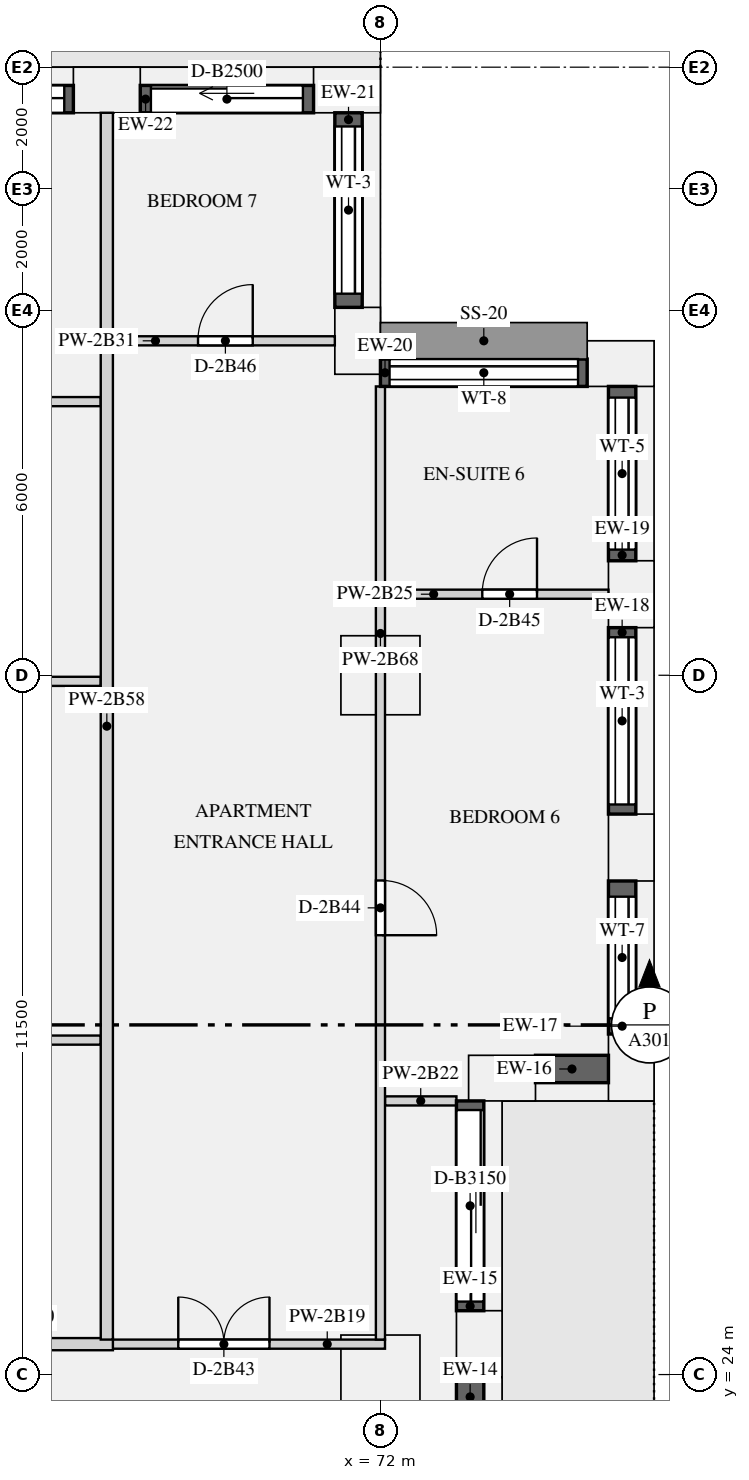
"""IFC4 building model, lengths in metres.
Left out: names, types, materials, properties, quantities, classifications, styles, units other than length and angle.
Written with IfcOpenShell. Run it as: python <this file> out.ifc"""

import sys

from ifc_helpers import new_model, si_unit, direction, frame, frame_2d, origin, origin_2d, place, context, subcontext, project, spatial, rectangle, extrude, element, fill, save


model = new_model("IFC4")
c1 = context("Model", 3, precision=1e-05, world=origin(), true_north=direction((0.0, 1.0)))
c2 = subcontext(c1, "Body", "Model", "MODEL_VIEW")
j1 = project(units=[si_unit("LENGTHUNIT", "METRE"), si_unit("PLANEANGLEUNIT", "RADIAN")], contexts=[c1])
p1 = place(None, origin())
s1 = spatial("IfcSite", under=j1, at=p1, CompositionType="ELEMENT")
p2 = place(p1, origin())
s2 = spatial("IfcBuilding", under=s1, at=p2, CompositionType="ELEMENT")
p3 = place(p2, frame((0.0, 0.0, 93.0)))
s3 = spatial("IfcBuildingStorey", under=s2, at=p3, CompositionType="ELEMENT", Elevation=93.0)
for number, where, z_axis, x_axis in (
    (1, (73.625, 24.5, 0.0), (0.0, 0.0, 1.0), (0.0, 1.0, 0.0)),
    (2, (74.0, 28.875, 0.0), (0.0, 0.0, 1.0), (1.0, 0.0, 0.0)),
    (3, (76.125, 29.05, 0.0), (0.0, 0.0, 1.0), (0.0, 1.0, 0.0)),
    (4, (76.125, 32.667, 0.0), (0.0, 0.0, 1.0), (0.0, 1.0, 0.0)),
    (5, (76.125, 36.833, 0.0), (0.0, 0.0, 1.0), (0.0, 1.0, 0.0)),
    (6, (75.95, 40.625, 0.0), (0.0, 0.0, 1.0), (-1.0, 0.0, 0.0)),
    (7, (71.625, 41.0, 0.0), (0.0, 0.0, 1.0), (0.0, 1.0, 0.0)),
    (8, (71.45, 45.125, 0.0), (0.0, 0.0, 1.0), (-1.0, 0.0, 0.0)),
    (9, (67.5, 45.125, 0.0), (0.0, 0.0, 1.0), (-1.0, 0.0, 0.0)),
):
    element("IfcColumn", number, at=place(p3, frame(where, z_axis=z_axis, x_axis=x_axis)), inside=s3, PredefinedType="USERDEFINED", context=c2, shape_type="SweptSolid", body=[
        extrude(rectangle(XDim=1.1, YDim=0.75, at=origin_2d()), origin(), (0.0, 0.0, 1.0), 3.15),
    ])
for number, where, z_axis, x_axis in (
    (10, (72.0, 24.0, 0.0), (0.0, 0.0, 1.0), (1.0, 0.0, 0.0)),
    (11, (72.0, 35.5, 0.0), (0.0, 0.0, 1.0), (1.0, 0.0, 0.0)),
):
    element("IfcColumn", number, at=place(p3, frame(where, z_axis=z_axis, x_axis=x_axis)), inside=s3, PredefinedType="COLUMN", context=c2, shape_type="SweptSolid", body=[
        extrude(rectangle(XDim=1.3, YDim=1.3, at=origin_2d()), origin(), (0.0, 0.0, 1.0), 3.15),
    ])
p4 = place(p3, frame((73.475, 21.05, 0.0), z_axis=(0.0, 0.0, 1.0), x_axis=(0.0, 1.0, 0.0)))
e12 = element("IfcWall", 12, at=p4, inside=s3, PredefinedType="SOLIDWALL", context=c2, shape_type="SweptSolid", body=[
    extrude(rectangle(XDim=2.9, YDim=0.45, at=frame_2d((1.45, 0.0))), origin(), (0.0, 0.0, 1.0), 2.83),
])
p5 = place(p4, frame((0.165, 0.0, 0.0)))
e13 = element("IfcOpeningElement", 13, at=p5, cuts=e12, PredefinedType="OPENING", context=c2, shape_type="SweptSolid", body=[
    extrude(rectangle(XDim=2.1, YDim=2.3, at=frame_2d((1.05, 1.15))), frame((0.0, 0.235, 0.0), z_axis=(0.0, -1.0, 0.0), x_axis=(1.0, 0.0, 0.0)), (0.0, 0.0, 1.0), 0.47),
])
p6 = place(p3, frame((73.475, 25.05, 0.0), z_axis=(0.0, 0.0, 1.0), x_axis=(0.0, 1.0, 0.0)))
e14 = element("IfcWall", 14, at=p6, inside=s3, PredefinedType="SOLIDWALL", context=c2, shape_type="SweptSolid", body=[
    extrude(rectangle(XDim=3.45, YDim=0.45, at=frame_2d((1.725, 0.0))), origin(), (0.0, 0.0, 1.0), 2.83),
])
p7 = place(p6, frame((0.15, 0.0, 0.0)))
e15 = element("IfcOpeningElement", 15, at=p7, cuts=e14, PredefinedType="OPENING", context=c2, shape_type="SweptSolid", body=[
    extrude(rectangle(XDim=3.15, YDim=2.3, at=frame_2d((1.575, 1.15))), frame((0.0, 0.235, 0.0), z_axis=(0.0, -1.0, 0.0), x_axis=(1.0, 0.0, 0.0)), (0.0, 0.0, 1.0), 0.47),
])
p8 = place(p3, frame((74.55, 29.025, 0.9), z_axis=(0.0, 0.0, 1.0), x_axis=(1.0, 0.0, 0.0)))
e16 = element("IfcWall", 16, at=p8, inside=s3, PredefinedType="SOLIDWALL", context=c2, shape_type="SweptSolid", body=[
    extrude(rectangle(XDim=1.2, YDim=0.45, at=frame_2d((0.6, 0.0))), origin(), (0.0, 0.0, 1.0), 1.93),
])
p9 = place(p3, frame((75.975, 29.6, 0.9), z_axis=(0.0, 0.0, 1.0), x_axis=(0.0, 1.0, 0.0)))
e17 = element("IfcWall", 17, at=p9, inside=s3, PredefinedType="SOLIDWALL", context=c2, shape_type="SweptSolid", body=[
    extrude(rectangle(XDim=2.517, YDim=0.45, at=frame_2d((1.258, 0.0))), origin(), (0.0, 0.0, 1.0), 1.93),
])
p10 = place(p9, frame((0.259, 0.0, 0.15)))
e18 = element("IfcOpeningElement", 18, at=p10, cuts=e17, PredefinedType="OPENING", context=c2, shape_type="SweptSolid", body=[
    extrude(rectangle(XDim=2.0, YDim=1.5, at=frame_2d((1.0, 0.75))), frame((0.0, 0.235, 0.0), z_axis=(0.0, -1.0, 0.0), x_axis=(1.0, 0.0, 0.0)), (0.0, 0.0, 1.0), 0.47),
])
p11 = place(p3, frame((75.975, 33.217, 0.9), z_axis=(0.0, 0.0, 1.0), x_axis=(0.0, 1.0, 0.0)))
e19 = element("IfcWall", 19, at=p11, inside=s3, PredefinedType="SOLIDWALL", context=c2, shape_type="SweptSolid", body=[
    extrude(rectangle(XDim=3.066, YDim=0.45, at=frame_2d((1.533, 0.0))), origin(), (0.0, 0.0, 1.0), 1.93),
])
p12 = place(p11, frame((0.158, 0.0, 0.15)))
e20 = element("IfcOpeningElement", 20, at=p12, cuts=e19, PredefinedType="OPENING", context=c2, shape_type="SweptSolid", body=[
    extrude(rectangle(XDim=2.75, YDim=1.5, at=frame_2d((1.375, 0.75))), frame((0.0, 0.235, 0.0), z_axis=(0.0, -1.0, 0.0), x_axis=(1.0, 0.0, 0.0)), (0.0, 0.0, 1.0), 0.47),
])
p13 = place(p3, frame((75.975, 37.383, 0.9), z_axis=(0.0, 0.0, 1.0), x_axis=(0.0, 1.0, 0.0)))
e21 = element("IfcWall", 21, at=p13, inside=s3, PredefinedType="SOLIDWALL", context=c2, shape_type="SweptSolid", body=[
    extrude(rectangle(XDim=2.867, YDim=0.45, at=frame_2d((1.434, 0.0))), origin(), (0.0, 0.0, 1.0), 1.93),
])
p14 = place(p13, frame((0.184, 0.0, 0.15)))
e22 = element("IfcOpeningElement", 22, at=p14, cuts=e21, PredefinedType="OPENING", context=c2, shape_type="SweptSolid", body=[
    extrude(rectangle(XDim=2.5, YDim=1.5, at=frame_2d((1.25, 0.75))), frame((0.0, 0.235, 0.0), z_axis=(0.0, -1.0, 0.0), x_axis=(1.0, 0.0, 0.0)), (0.0, 0.0, 1.0), 0.47),
])
p15 = place(p3, frame((75.4, 40.475, 0.9), z_axis=(0.0, 0.0, 1.0), x_axis=(-1.0, 0.0, 0.0)))
e23 = element("IfcWall", 23, at=p15, inside=s3, PredefinedType="SOLIDWALL", context=c2, shape_type="SweptSolid", body=[
    extrude(rectangle(XDim=3.4, YDim=0.45, at=frame_2d((1.7, 0.0))), origin(), (0.0, 0.0, 1.0), 1.93),
])
p16 = place(p15, frame((0.15, 0.0, 0.15)))
e24 = element("IfcOpeningElement", 24, at=p16, cuts=e23, PredefinedType="OPENING", context=c2, shape_type="SweptSolid", body=[
    extrude(rectangle(XDim=3.1, YDim=1.5, at=frame_2d((1.55, 0.75))), frame((0.0, 0.235, 0.0), z_axis=(0.0, -1.0, 0.0), x_axis=(1.0, 0.0, 0.0)), (0.0, 0.0, 1.0), 0.47),
])
p17 = place(p3, frame((71.475, 41.55, 0.9), z_axis=(0.0, 0.0, 1.0), x_axis=(0.0, 1.0, 0.0)))
e25 = element("IfcWall", 25, at=p17, inside=s3, PredefinedType="SOLIDWALL", context=c2, shape_type="SweptSolid", body=[
    extrude(rectangle(XDim=3.2, YDim=0.45, at=frame_2d((1.6, 0.0))), origin(), (0.0, 0.0, 1.0), 1.93),
])
p18 = place(p17, frame((0.225, 0.0, 0.15)))
e26 = element("IfcOpeningElement", 26, at=p18, cuts=e25, PredefinedType="OPENING", context=c2, shape_type="SweptSolid", body=[
    extrude(rectangle(XDim=2.75, YDim=1.5, at=frame_2d((1.375, 0.75))), frame((0.0, 0.235, 0.0), z_axis=(0.0, -1.0, 0.0), x_axis=(1.0, 0.0, 0.0)), (0.0, 0.0, 1.0), 0.47),
])
p19 = place(p3, frame((70.9, 44.975, 0.0), z_axis=(0.0, 0.0, 1.0), x_axis=(-1.0, 0.0, 0.0)))
e27 = element("IfcWall", 27, at=p19, inside=s3, PredefinedType="SOLIDWALL", context=c2, shape_type="SweptSolid", body=[
    extrude(rectangle(XDim=2.85, YDim=0.45, at=frame_2d((1.425, 0.0))), origin(), (0.0, 0.0, 1.0), 2.83),
])
p20 = place(p19, frame((0.175, 0.0, 0.0)))
e28 = element("IfcOpeningElement", 28, at=p20, cuts=e27, PredefinedType="OPENING", context=c2, shape_type="SweptSolid", body=[
    extrude(rectangle(XDim=2.5, YDim=2.3, at=frame_2d((1.25, 1.15))), frame((0.0, 0.235, 0.0), z_axis=(0.0, -1.0, 0.0), x_axis=(1.0, 0.0, 0.0)), (0.0, 0.0, 1.0), 0.47),
])
p21 = place(p3, frame((66.95, 44.975, 0.0), z_axis=(0.0, 0.0, 1.0), x_axis=(-1.0, 0.0, 0.0)))
e29 = element("IfcWall", 29, at=p21, inside=s3, PredefinedType="SOLIDWALL", context=c2, shape_type="SweptSolid", body=[
    extrude(rectangle(XDim=3.4, YDim=0.45, at=frame_2d((1.7, 0.0))), origin(), (0.0, 0.0, 1.0), 2.83),
])
p22 = place(p21, frame((0.15, 0.0, 0.0)))
e30 = element("IfcOpeningElement", 30, at=p22, cuts=e29, PredefinedType="OPENING", context=c2, shape_type="SweptSolid", body=[
    extrude(rectangle(XDim=3.1, YDim=2.3, at=frame_2d((1.55, 1.15))), frame((0.0, 0.235, 0.0), z_axis=(0.0, -1.0, 0.0), x_axis=(1.0, 0.0, 0.0)), (0.0, 0.0, 1.0), 0.47),
])
p23 = place(p3, frame((67.4, 24.5, 0.0), z_axis=(0.0, 0.0, 1.0), x_axis=(1.0, 0.0, 0.0)))
e31 = element("IfcWall", 31, at=p23, inside=s3, PredefinedType="PARTITIONING", context=c2, shape_type="SweptSolid", body=[
    extrude(rectangle(XDim=4.675, YDim=0.15, at=frame_2d((2.337, 0.0))), origin(), (0.0, 0.0, 1.0), 2.83),
])
p24 = place(p23, frame((1.275, 0.0, 0.0)))
e32 = element("IfcOpeningElement", 32, at=p24, cuts=e31, PredefinedType="OPENING", context=c2, shape_type="SweptSolid", body=[
    extrude(rectangle(XDim=1.5, YDim=2.1, at=frame_2d((0.75, 1.05))), frame((0.0, 0.085, 0.0), z_axis=(0.0, -1.0, 0.0), x_axis=(1.0, 0.0, 0.0)), (0.0, 0.0, 1.0), 0.17),
])
p25 = place(p3, frame((64.4, 24.5, 0.0), z_axis=(0.0, 0.0, 1.0), x_axis=(1.0, 0.0, 0.0)))
e33 = element("IfcWall", 33, at=p25, inside=s3, PredefinedType="PARTITIONING", context=c2, shape_type="SweptSolid", body=[
    extrude(rectangle(XDim=3.2, YDim=0.2, at=frame_2d((1.6, 0.0))), origin(), (0.0, 0.0, 1.0), 2.83),
])
p26 = place(p3, frame((72.075, 28.5, 0.0), z_axis=(0.0, 0.0, 1.0), x_axis=(1.0, 0.0, 0.0)))
e34 = element("IfcWall", 34, at=p26, inside=s3, PredefinedType="PARTITIONING", context=c2, shape_type="SweptSolid", body=[
    extrude(rectangle(XDim=1.175, YDim=0.15, at=frame_2d((0.587, 0.0))), origin(), (0.0, 0.0, 1.0), 2.83),
])
p27 = place(p3, frame((72.075, 36.833, 0.0), z_axis=(0.0, 0.0, 1.0), x_axis=(1.0, 0.0, 0.0)))
e35 = element("IfcWall", 35, at=p27, inside=s3, PredefinedType="PARTITIONING", context=c2, shape_type="SweptSolid", body=[
    extrude(rectangle(XDim=3.675, YDim=0.15, at=frame_2d((1.837, 0.0))), origin(), (0.0, 0.0, 1.0), 2.83),
])
p28 = place(p27, frame((1.6, 0.0, 0.0)))
e36 = element("IfcOpeningElement", 36, at=p28, cuts=e35, PredefinedType="OPENING", context=c2, shape_type="SweptSolid", body=[
    extrude(rectangle(XDim=0.9, YDim=2.1, at=frame_2d((0.45, 1.05))), frame((0.0, 0.085, 0.0), z_axis=(0.0, -1.0, 0.0), x_axis=(1.0, 0.0, 0.0)), (0.0, 0.0, 1.0), 0.17),
])
p29 = place(p3, frame((59.8, 35.4, 0.0), z_axis=(0.0, 0.0, 1.0), x_axis=(1.0, 0.0, 0.0)))
e37 = element("IfcWall", 37, at=p29, inside=s3, PredefinedType="PARTITIONING", context=c2, shape_type="SweptSolid", body=[
    extrude(rectangle(XDim=7.6, YDim=0.15, at=frame_2d((3.8, 0.0))), origin(), (0.0, 0.0, 1.0), 2.83),
])
p30 = place(p29, frame((5.025, 0.0, 0.0)))
e38 = element("IfcOpeningElement", 38, at=p30, cuts=e37, PredefinedType="OPENING", context=c2, shape_type="SweptSolid", body=[
    extrude(rectangle(XDim=1.5, YDim=2.1, at=frame_2d((0.75, 1.05))), frame((0.0, 0.085, 0.0), z_axis=(0.0, -1.0, 0.0), x_axis=(1.0, 0.0, 0.0)), (0.0, 0.0, 1.0), 0.17),
])
p31 = place(p3, frame((67.6, 41.0, 0.0), z_axis=(0.0, 0.0, 1.0), x_axis=(1.0, 0.0, 0.0)))
e39 = element("IfcWall", 39, at=p31, inside=s3, PredefinedType="PARTITIONING", context=c2, shape_type="SweptSolid", body=[
    extrude(rectangle(XDim=3.65, YDim=0.15, at=frame_2d((1.825, 0.0))), origin(), (0.0, 0.0, 1.0), 2.83),
])
p32 = place(p31, frame((1.4, 0.0, 0.0)))
e40 = element("IfcOpeningElement", 40, at=p32, cuts=e39, PredefinedType="OPENING", context=c2, shape_type="SweptSolid", body=[
    extrude(rectangle(XDim=0.9, YDim=2.1, at=frame_2d((0.45, 1.05))), frame((0.0, 0.085, 0.0), z_axis=(0.0, -1.0, 0.0), x_axis=(1.0, 0.0, 0.0)), (0.0, 0.0, 1.0), 0.17),
])
p33 = place(p3, frame((45.075, 40.0, 0.0), z_axis=(0.0, 0.0, 1.0), x_axis=(1.0, 0.0, 0.0)))
e41 = element("IfcWall", 41, at=p33, inside=s3, PredefinedType="PARTITIONING", context=c2, shape_type="SweptSolid", body=[
    extrude(rectangle(XDim=22.325, YDim=0.15, at=frame_2d((11.163, 0.0))), origin(), (0.0, 0.0, 1.0), 2.83),
])
p34 = place(p33, frame((0.975, 0.0, 0.0)))
e42 = element("IfcOpeningElement", 42, at=p34, cuts=e41, PredefinedType="OPENING", context=c2, shape_type="SweptSolid", body=[
    extrude(rectangle(XDim=0.9, YDim=2.1, at=frame_2d((0.45, 1.05))), frame((0.0, 0.085, 0.0), z_axis=(0.0, -1.0, 0.0), x_axis=(1.0, 0.0, 0.0)), (0.0, 0.0, 1.0), 0.17),
])
p35 = place(p33, frame((8.475, 0.0, 0.0)))
e43 = element("IfcOpeningElement", 43, at=p35, cuts=e41, PredefinedType="OPENING", context=c2, shape_type="SweptSolid", body=[
    extrude(rectangle(XDim=0.9, YDim=2.1, at=frame_2d((0.45, 1.05))), frame((0.0, 0.085, 0.0), z_axis=(0.0, -1.0, 0.0), x_axis=(1.0, 0.0, 0.0)), (0.0, 0.0, 1.0), 0.17),
])
p36 = place(p33, frame((19.725, 0.0, 0.0)))
e44 = element("IfcOpeningElement", 44, at=p36, cuts=e41, PredefinedType="OPENING", context=c2, shape_type="SweptSolid", body=[
    extrude(rectangle(XDim=0.9, YDim=2.1, at=frame_2d((0.45, 1.05))), frame((0.0, 0.085, 0.0), z_axis=(0.0, -1.0, 0.0), x_axis=(1.0, 0.0, 0.0)), (0.0, 0.0, 1.0), 0.17),
])
p37 = place(p3, frame((59.8, 29.5, 0.0), z_axis=(0.0, 0.0, 1.0), x_axis=(1.0, 0.0, 0.0)))
e45 = element("IfcWall", 45, at=p37, inside=s3, PredefinedType="PARTITIONING", context=c2, shape_type="SweptSolid", body=[
    extrude(rectangle(XDim=7.6, YDim=0.15, at=frame_2d((3.8, 0.0))), origin(), (0.0, 0.0, 1.0), 2.83),
])
p38 = place(p37, frame((1.9, 0.0, 0.0)))
e46 = element("IfcOpeningElement", 46, at=p38, cuts=e45, PredefinedType="OPENING", context=c2, shape_type="SweptSolid", body=[
    extrude(rectangle(XDim=0.9, YDim=2.1, at=frame_2d((0.45, 1.05))), frame((0.0, 0.085, 0.0), z_axis=(0.0, -1.0, 0.0), x_axis=(1.0, 0.0, 0.0)), (0.0, 0.0, 1.0), 0.17),
])
p39 = place(p3, frame((67.5, 24.575, 0.0), z_axis=(0.0, 0.0, 1.0), x_axis=(0.0, 1.0, 0.0)))
e47 = element("IfcWall", 47, at=p39, inside=s3, PredefinedType="PARTITIONING", context=c2, shape_type="SweptSolid", body=[
    extrude(rectangle(XDim=20.175, YDim=0.2, at=frame_2d((10.087, 0.0))), origin(), (0.0, 0.0, 1.0), 2.83),
])
p40 = place(p3, frame((72.0, 24.575, 0.0), z_axis=(0.0, 0.0, 1.0), x_axis=(0.0, 1.0, 0.0)))
e48 = element("IfcWall", 48, at=p40, inside=s3, PredefinedType="PARTITIONING", context=c2, shape_type="SweptSolid", body=[
    extrude(rectangle(XDim=15.675, YDim=0.15, at=frame_2d((7.837, 0.0))), origin(), (0.0, 0.0, 1.0), 2.83),
])
p41 = place(p40, frame((6.65, 0.0, 0.0)))
e49 = element("IfcOpeningElement", 49, at=p41, cuts=e48, PredefinedType="OPENING", context=c2, shape_type="SweptSolid", body=[
    extrude(rectangle(XDim=0.9, YDim=2.1, at=frame_2d((0.45, 1.05))), frame((0.0, 0.085, 0.0), z_axis=(0.0, -1.0, 0.0), x_axis=(1.0, 0.0, 0.0)), (0.0, 0.0, 1.0), 0.17),
])
p42 = place(p7, origin())
e50 = element("IfcDoor", 50, at=p42, inside=s3, OperationType="SLIDING_TO_LEFT", PredefinedType="DOOR", context=c2, shape_type="SweptSolid", body=[
    extrude(rectangle(XDim=3.15, YDim=2.3, at=frame_2d((1.575, 1.15))), frame((0.0, -0.07, 0.0), z_axis=(0.0, -1.0, 0.0), x_axis=(1.0, 0.0, 0.0)), (0.0, 0.0, 1.0), 0.05),
])
fill(e15, e50)
p43 = place(p10, origin())
e51 = element("IfcWindow", 51, at=p43, inside=s3, PartitioningType="SINGLE_PANEL", PredefinedType="WINDOW", context=c2, shape_type="SweptSolid", body=[
    extrude(rectangle(XDim=2.0, YDim=1.5, at=frame_2d((1.0, 0.75))), frame((0.0, -0.065, 0.0), z_axis=(0.0, -1.0, 0.0), x_axis=(1.0, 0.0, 0.0)), (0.0, 0.0, 1.0), 0.06),
])
fill(e18, e51)
p44 = place(p12, origin())
e52 = element("IfcWindow", 52, at=p44, inside=s3, PartitioningType="SINGLE_PANEL", PredefinedType="WINDOW", context=c2, shape_type="SweptSolid", body=[
    extrude(rectangle(XDim=2.75, YDim=1.5, at=frame_2d((1.375, 0.75))), frame((0.0, -0.065, 0.0), z_axis=(0.0, -1.0, 0.0), x_axis=(1.0, 0.0, 0.0)), (0.0, 0.0, 1.0), 0.06),
])
fill(e20, e52)
p45 = place(p14, origin())
e53 = element("IfcWindow", 53, at=p45, inside=s3, PartitioningType="SINGLE_PANEL", PredefinedType="WINDOW", context=c2, shape_type="SweptSolid", body=[
    extrude(rectangle(XDim=2.5, YDim=1.5, at=frame_2d((1.25, 0.75))), frame((0.0, -0.065, 0.0), z_axis=(0.0, -1.0, 0.0), x_axis=(1.0, 0.0, 0.0)), (0.0, 0.0, 1.0), 0.06),
])
fill(e22, e53)
p46 = place(p16, origin())
e54 = element("IfcWindow", 54, at=p46, inside=s3, PartitioningType="SINGLE_PANEL", PredefinedType="WINDOW", context=c2, shape_type="SweptSolid", body=[
    extrude(rectangle(XDim=3.1, YDim=1.5, at=frame_2d((1.55, 0.75))), frame((0.0, -0.065, 0.0), z_axis=(0.0, -1.0, 0.0), x_axis=(1.0, 0.0, 0.0)), (0.0, 0.0, 1.0), 0.06),
])
fill(e24, e54)
p47 = place(p18, origin())
e55 = element("IfcWindow", 55, at=p47, inside=s3, PartitioningType="SINGLE_PANEL", PredefinedType="WINDOW", context=c2, shape_type="SweptSolid", body=[
    extrude(rectangle(XDim=2.75, YDim=1.5, at=frame_2d((1.375, 0.75))), frame((0.0, -0.065, 0.0), z_axis=(0.0, -1.0, 0.0), x_axis=(1.0, 0.0, 0.0)), (0.0, 0.0, 1.0), 0.06),
])
fill(e26, e55)
p48 = place(p20, origin())
e56 = element("IfcDoor", 56, at=p48, inside=s3, OperationType="SLIDING_TO_LEFT", PredefinedType="DOOR", context=c2, shape_type="SweptSolid", body=[
    extrude(rectangle(XDim=2.5, YDim=2.3, at=frame_2d((1.25, 1.15))), frame((0.0, -0.07, 0.0), z_axis=(0.0, -1.0, 0.0), x_axis=(1.0, 0.0, 0.0)), (0.0, 0.0, 1.0), 0.05),
])
fill(e28, e56)
p49 = place(p22, origin())
e57 = element("IfcDoor", 57, at=p49, inside=s3, OperationType="SLIDING_TO_LEFT", PredefinedType="DOOR", context=c2, shape_type="SweptSolid", body=[
    extrude(rectangle(XDim=3.1, YDim=2.3, at=frame_2d((1.55, 1.15))), frame((0.0, -0.07, 0.0), z_axis=(0.0, -1.0, 0.0), x_axis=(1.0, 0.0, 0.0)), (0.0, 0.0, 1.0), 0.05),
])
fill(e30, e57)
p50 = place(p24, origin())
e58 = element("IfcDoor", 58, at=p50, inside=s3, OperationType="DOUBLE_DOOR_SINGLE_SWING", PredefinedType="DOOR", context=c2, shape_type="SweptSolid", body=[
    extrude(rectangle(XDim=1.5, YDim=2.1, at=frame_2d((0.75, 1.05))), frame((0.0, 0.025, 0.0), z_axis=(0.0, -1.0, 0.0), x_axis=(1.0, 0.0, 0.0)), (0.0, 0.0, 1.0), 0.05),
])
fill(e32, e58)
p51 = place(p41, frame((0.9, 0.0, 0.0), z_axis=(0.0, 0.0, 1.0), x_axis=(-1.0, 0.0, 0.0)))
e59 = element("IfcDoor", 59, at=p51, inside=s3, OperationType="SINGLE_SWING_RIGHT", PredefinedType="DOOR", context=c2, shape_type="SweptSolid", body=[
    extrude(rectangle(XDim=0.9, YDim=2.1, at=frame_2d((0.45, 1.05))), frame((0.0, 0.025, 0.0), z_axis=(0.0, -1.0, 0.0), x_axis=(1.0, 0.0, 0.0)), (0.0, 0.0, 1.0), 0.05),
])
fill(e49, e59)
p52 = place(p28, origin())
e60 = element("IfcDoor", 60, at=p52, inside=s3, OperationType="SINGLE_SWING_RIGHT", PredefinedType="DOOR", context=c2, shape_type="SweptSolid", body=[
    extrude(rectangle(XDim=0.9, YDim=2.1, at=frame_2d((0.45, 1.05))), frame((0.0, 0.025, 0.0), z_axis=(0.0, -1.0, 0.0), x_axis=(1.0, 0.0, 0.0)), (0.0, 0.0, 1.0), 0.05),
])
fill(e36, e60)
p53 = place(p32, origin())
e61 = element("IfcDoor", 61, at=p53, inside=s3, OperationType="SINGLE_SWING_RIGHT", PredefinedType="DOOR", context=c2, shape_type="SweptSolid", body=[
    extrude(rectangle(XDim=0.9, YDim=2.1, at=frame_2d((0.45, 1.05))), frame((0.0, 0.025, 0.0), z_axis=(0.0, -1.0, 0.0), x_axis=(1.0, 0.0, 0.0)), (0.0, 0.0, 1.0), 0.05),
])
fill(e40, e61)
save(model, sys.argv[1])
